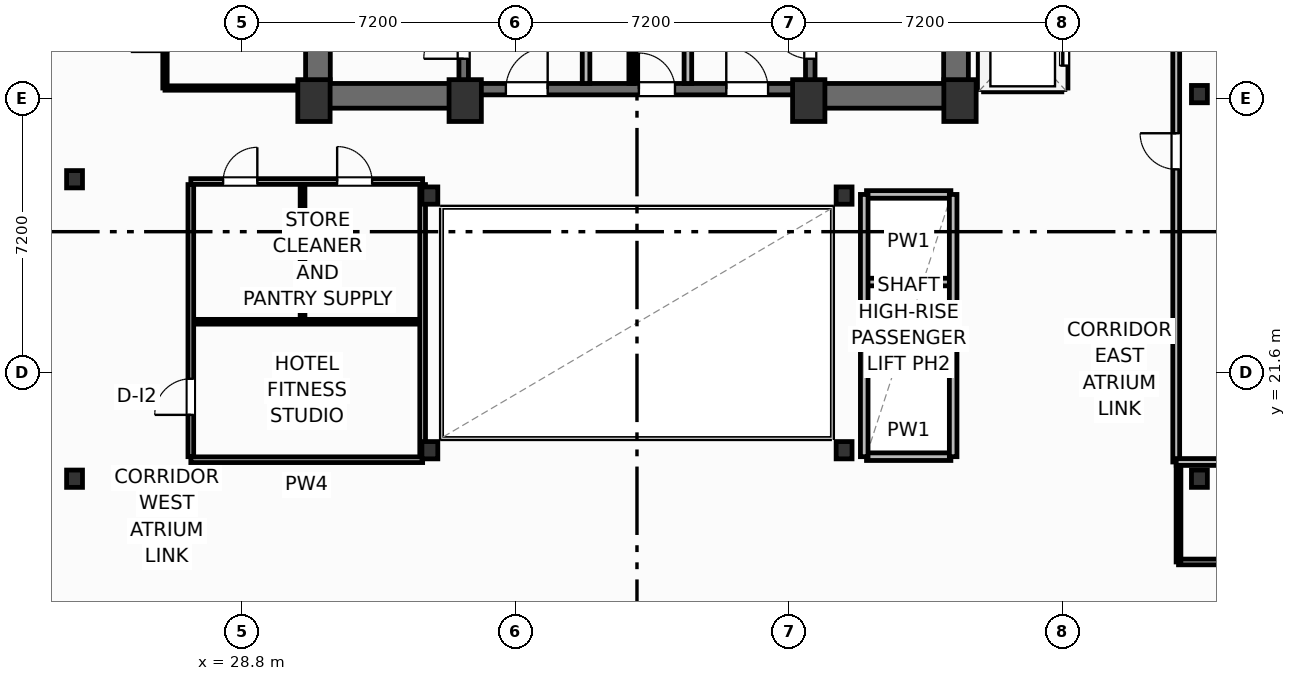
"""IFC4 building model, lengths in metres.
Left out: names, types, materials, properties, quantities, classifications, styles, units other than length and angle.
Written with IfcOpenShell. Run it as: python <this file> out.ifc"""

import sys

from ifc_helpers import new_model, si_unit, direction, frame, frame_2d, origin, origin_2d, place, context, subcontext, project, spatial, rectangle, i_section, extrude, element, fill, save


model = new_model("IFC4")
c1 = context("Model", 3, precision=1e-05, world=origin(), true_north=direction((0.0, 1.0)))
c2 = subcontext(c1, "Body", "Model", "MODEL_VIEW")
j1 = project(units=[si_unit("LENGTHUNIT", "METRE"), si_unit("PLANEANGLEUNIT", "RADIAN")], contexts=[c1])
p1 = place(None, origin())
s1 = spatial("IfcSite", under=j1, at=p1, CompositionType="ELEMENT")
p2 = place(p1, origin())
s2 = spatial("IfcBuilding", under=s1, at=p2, CompositionType="ELEMENT")
p3 = place(p2, frame((0.0, 0.0, 204.2)))
s3 = spatial("IfcBuildingStorey", under=s2, at=p3, CompositionType="ELEMENT", Elevation=204.2)
for number, where, z_axis, x_axis in (
    (1, (30.7, 28.75, 0.0), (0.0, 0.0, 1.0), (1.0, 0.0, 0.0)),
    (2, (34.68, 28.75, 0.0), (0.0, 0.0, 1.0), (1.0, 0.0, 0.0)),
    (3, (43.72, 28.75, 0.0), (0.0, 0.0, 1.0), (1.0, 0.0, 0.0)),
    (4, (47.7, 28.75, 0.0), (0.0, 0.0, 1.0), (1.0, 0.0, 0.0)),
):
    element("IfcColumn", number, at=place(p3, frame(where, z_axis=z_axis, x_axis=x_axis)), inside=s3, PredefinedType="COLUMN", context=c2, shape_type="SweptSolid", body=[
        extrude(rectangle(XDim=0.85, YDim=1.1, at=origin_2d()), origin(), (0.0, 0.0, 1.0), 3.7),
    ])
for number, where, z_axis, x_axis in (
    (5, (33.75, 19.55, 0.0), (0.0, 0.0, 1.0), (1.0, 0.0, 0.0)),
    (6, (44.65, 19.55, 0.0), (0.0, 0.0, 1.0), (1.0, 0.0, 0.0)),
    (7, (33.75, 26.25, 0.0), (0.0, 0.0, 1.0), (1.0, 0.0, 0.0)),
    (8, (44.65, 26.25, 0.0), (0.0, 0.0, 1.0), (1.0, 0.0, 0.0)),
    (9, (24.4, 18.8, 0.0), (0.0, 0.0, 1.0), (1.0, 0.0, 0.0)),
    (10, (24.4, 26.68, 0.0), (0.0, 0.0, 1.0), (1.0, 0.0, 0.0)),
    (11, (54.0, 18.8, 0.0), (0.0, 0.0, 1.0), (1.0, 0.0, 0.0)),
    (12, (54.0, 28.92, 0.0), (0.0, 0.0, 1.0), (1.0, 0.0, 0.0)),
):
    element("IfcColumn", number, at=place(p3, frame(where, z_axis=z_axis, x_axis=x_axis)), inside=s3, PredefinedType="COLUMN", context=c2, shape_type="SweptSolid", body=[
        extrude(i_section(OverallWidth=0.418, OverallDepth=0.455, WebThickness=0.042, FlangeThickness=0.068, FilletRadius=0.025, at=origin_2d()), origin(), (0.0, 0.0, 1.0), 3.7),
    ])
for number, where, z_axis, x_axis in (
    (13, (30.805, 29.2, 0.0), (0.0, 0.0, 1.0), (0.0, 1.0, 0.0)),
    (14, (47.595, 29.2, 0.0), (0.0, 0.0, 1.0), (0.0, 1.0, 0.0)),
):
    element("IfcWall", number, at=place(p3, frame(where, z_axis=z_axis, x_axis=x_axis)), inside=s3, PredefinedType="SHEAR", context=c2, shape_type="SweptSolid", body=[
        extrude(rectangle(XDim=9.22, YDim=0.65, at=frame_2d((4.61, 0.0))), origin(), (0.0, 0.0, 1.0), 3.38),
    ])
p4 = place(p3, frame((30.48, 28.875, 0.0), z_axis=(0.0, 0.0, 1.0), x_axis=(1.0, 0.0, 0.0)))
e15 = element("IfcWall", 15, at=p4, inside=s3, PredefinedType="SHEAR", context=c2, shape_type="SweptSolid", body=[
    extrude(rectangle(XDim=4.32, YDim=0.65, at=frame_2d((2.16, 0.0))), origin(), (0.0, 0.0, 1.0), 3.38),
])
p5 = place(p3, frame((43.6, 28.875, 0.0), z_axis=(0.0, 0.0, 1.0), x_axis=(1.0, 0.0, 0.0)))
e16 = element("IfcWall", 16, at=p5, inside=s3, PredefinedType="SHEAR", context=c2, shape_type="SweptSolid", body=[
    extrude(rectangle(XDim=4.32, YDim=0.65, at=frame_2d((2.16, 0.0))), origin(), (0.0, 0.0, 1.0), 3.38),
])
p6 = place(p3, frame((34.8, 29.05, 0.0), z_axis=(0.0, 0.0, 1.0), x_axis=(1.0, 0.0, 0.0)))
e17 = element("IfcWall", 17, at=p6, inside=s3, PredefinedType="SHEAR", context=c2, shape_type="SweptSolid", body=[
    extrude(rectangle(XDim=8.8, YDim=0.3, at=frame_2d((4.4, 0.0))), origin(), (0.0, 0.0, 1.0), 3.38),
])
p7 = place(p6, frame((0.95, 0.0, 0.0)))
e18 = element("IfcOpeningElement", 18, at=p7, cuts=e17, PredefinedType="OPENING", context=c2, shape_type="SweptSolid", body=[
    extrude(rectangle(XDim=1.1, YDim=2.15, at=frame_2d((0.55, 1.075))), frame((0.0, 0.16, 0.0), z_axis=(0.0, -1.0, 0.0), x_axis=(1.0, 0.0, 0.0)), (0.0, 0.0, 1.0), 0.32),
])
p8 = place(p6, frame((6.75, 0.0, 0.0)))
e19 = element("IfcOpeningElement", 19, at=p8, cuts=e17, PredefinedType="OPENING", context=c2, shape_type="SweptSolid", body=[
    extrude(rectangle(XDim=1.1, YDim=2.15, at=frame_2d((0.55, 1.075))), frame((0.0, 0.16, 0.0), z_axis=(0.0, -1.0, 0.0), x_axis=(1.0, 0.0, 0.0)), (0.0, 0.0, 1.0), 0.32),
])
p9 = place(p6, frame((4.45, 0.0, 0.0)))
e20 = element("IfcOpeningElement", 20, at=p9, cuts=e17, PredefinedType="OPENING", context=c2, shape_type="SweptSolid", body=[
    extrude(rectangle(XDim=0.95, YDim=2.15, at=frame_2d((0.475, 1.075))), frame((0.0, 0.16, 0.0), z_axis=(0.0, -1.0, 0.0), x_axis=(1.0, 0.0, 0.0)), (0.0, 0.0, 1.0), 0.32),
])
p10 = place(p3, frame((34.64, 29.2, 0.0), z_axis=(0.0, 0.0, 1.0), x_axis=(0.0, 1.0, 0.0)))
e21 = element("IfcWall", 21, at=p10, inside=s3, PredefinedType="SHEAR", context=c2, shape_type="SweptSolid", body=[
    extrude(rectangle(XDim=9.22, YDim=0.25, at=frame_2d((4.61, 0.0))), origin(), (0.0, 0.0, 1.0), 3.38),
])
p11 = place(p10, frame((0.65, 0.0, 0.0)))
e22 = element("IfcOpeningElement", 22, at=p11, cuts=e21, PredefinedType="OPENING", context=c2, shape_type="SweptSolid", body=[
    extrude(rectangle(XDim=1.05, YDim=2.15, at=frame_2d((0.525, 1.075))), frame((0.0, 0.135, 0.0), z_axis=(0.0, -1.0, 0.0), x_axis=(1.0, 0.0, 0.0)), (0.0, 0.0, 1.0), 0.27),
])
p12 = place(p3, frame((43.76, 29.2, 0.0), z_axis=(0.0, 0.0, 1.0), x_axis=(0.0, 1.0, 0.0)))
e23 = element("IfcWall", 23, at=p12, inside=s3, PredefinedType="SHEAR", context=c2, shape_type="SweptSolid", body=[
    extrude(rectangle(XDim=9.22, YDim=0.25, at=frame_2d((4.61, 0.0))), origin(), (0.0, 0.0, 1.0), 3.38),
])
p13 = place(p12, frame((0.65, 0.0, 0.0)))
e24 = element("IfcOpeningElement", 24, at=p13, cuts=e23, PredefinedType="OPENING", context=c2, shape_type="SweptSolid", body=[
    extrude(rectangle(XDim=1.05, YDim=2.15, at=frame_2d((0.525, 1.075))), frame((0.0, 0.135, 0.0), z_axis=(0.0, -1.0, 0.0), x_axis=(1.0, 0.0, 0.0)), (0.0, 0.0, 1.0), 0.27),
])
p14 = place(p3, frame((53.45, 16.61, 0.0), z_axis=(0.0, 0.0, 1.0), x_axis=(1.0, 0.0, 0.0)))
e25 = element("IfcWall", 25, at=p14, inside=s3, PredefinedType="PARTITIONING", context=c2, shape_type="SweptSolid", body=[
    extrude(rectangle(XDim=16.55, YDim=0.15, at=frame_2d((8.275, 0.0))), origin(), (0.0, 0.0, 1.0), 3.38),
])
p15 = place(p14, frame((2.61, 0.0, 0.0)))
e26 = element("IfcOpeningElement", 26, at=p15, cuts=e25, PredefinedType="OPENING", context=c2, shape_type="SweptSolid", body=[
    extrude(rectangle(XDim=0.92, YDim=2.05, at=frame_2d((0.46, 1.025))), frame((0.0, 0.085, 0.0), z_axis=(0.0, -1.0, 0.0), x_axis=(1.0, 0.0, 0.0)), (0.0, 0.0, 1.0), 0.17),
])
p16 = place(p3, frame((53.45, 16.61, 0.0), z_axis=(0.0, 0.0, 1.0), x_axis=(0.0, 1.0, 0.0)))
e27 = element("IfcWall", 27, at=p16, inside=s3, PredefinedType="PARTITIONING", context=c2, shape_type="SweptSolid", body=[
    extrude(rectangle(XDim=2.63, YDim=0.125, at=frame_2d((1.315, 0.0))), origin(), (0.0, 0.0, 1.0), 1.165),
])
p17 = place(p3, frame((53.39, 19.24, 0.0), z_axis=(0.0, 0.0, 1.0), x_axis=(0.0, 1.0, 0.0)))
e28 = element("IfcWall", 28, at=p17, inside=s3, PredefinedType="PARTITIONING", context=c2, shape_type="SweptSolid", body=[
    extrude(rectangle(XDim=20.06, YDim=0.18, at=frame_2d((10.03, 0.0))), origin(), (0.0, 0.0, 1.0), 3.38),
])
p18 = place(p17, frame((7.7, 0.0, 0.0)))
e29 = element("IfcOpeningElement", 29, at=p18, cuts=e28, PredefinedType="OPENING", context=c2, shape_type="SweptSolid", body=[
    extrude(rectangle(XDim=0.95, YDim=2.05, at=frame_2d((0.475, 1.025))), frame((0.0, 0.1, 0.0), z_axis=(0.0, -1.0, 0.0), x_axis=(1.0, 0.0, 0.0)), (0.0, 0.0, 1.0), 0.2),
])
p19 = place(p3, frame((53.39, 19.24, 0.0), z_axis=(0.0, 0.0, 1.0), x_axis=(1.0, 0.0, 0.0)))
e30 = element("IfcWall", 30, at=p19, inside=s3, PredefinedType="PARTITIONING", context=c2, shape_type="SweptSolid", body=[
    extrude(rectangle(XDim=21.922, YDim=0.18, at=frame_2d((10.961, 0.0))), origin(), (0.0, 0.0, 1.0), 1.165),
])
for number, where, z_axis, x_axis in (
    (31, (37.86, 29.2, 0.0), (0.0, 0.0, 1.0), (0.0, 1.0, 0.0)),
    (32, (40.54, 29.2, 0.0), (0.0, 0.0, 1.0), (0.0, 1.0, 0.0)),
):
    element("IfcWall", number, at=place(p3, frame(where, z_axis=z_axis, x_axis=x_axis)), inside=s3, PredefinedType="PARTITIONING", context=c2, shape_type="SweptSolid", body=[
        extrude(rectangle(XDim=5.18, YDim=0.2, at=frame_2d((2.59, 0.0))), origin(), (0.0, 0.0, 1.0), 3.38),
    ])
p20 = place(p3, frame((39.05, 29.2, 0.0), z_axis=(0.0, 0.0, 1.0), x_axis=(0.0, 1.0, 0.0)))
e33 = element("IfcWall", 33, at=p20, inside=s3, PredefinedType="PARTITIONING", context=c2, shape_type="SweptSolid", body=[
    extrude(rectangle(XDim=5.22, YDim=0.125, at=frame_2d((2.61, 0.0))), origin(), (0.0, 0.0, 1.0), 3.38),
])
p21 = place(p20, frame((2.05, 0.0, 0.0)))
e34 = element("IfcOpeningElement", 34, at=p21, cuts=e33, PredefinedType="OPENING", context=c2, shape_type="SweptSolid", body=[
    extrude(rectangle(XDim=0.85, YDim=2.05, at=frame_2d((0.425, 1.025))), frame((0.0, 0.073, 0.0), z_axis=(0.0, -1.0, 0.0), x_axis=(1.0, 0.0, 0.0)), (0.0, 0.0, 1.0), 0.145),
])
p22 = place(p3, frame((27.46, 19.3, 0.0), z_axis=(0.0, 0.0, 1.0), x_axis=(1.0, 0.0, 0.0)))
e35 = element("IfcWall", 35, at=p22, inside=s3, PredefinedType="PARTITIONING", context=c2, shape_type="SweptSolid", body=[
    extrude(rectangle(XDim=6.1, YDim=0.15, at=frame_2d((3.05, 0.0))), origin(), (0.0, 0.0, 1.0), 2.592),
])
p23 = place(p3, frame((27.46, 26.62, 0.0), z_axis=(0.0, 0.0, 1.0), x_axis=(1.0, 0.0, 0.0)))
e36 = element("IfcWall", 36, at=p23, inside=s3, PredefinedType="PARTITIONING", context=c2, shape_type="SweptSolid", body=[
    extrude(rectangle(XDim=6.1, YDim=0.15, at=frame_2d((3.05, 0.0))), origin(), (0.0, 0.0, 1.0), 2.592),
])
p24 = place(p23, frame((0.85, 0.0, 0.0)))
e37 = element("IfcOpeningElement", 37, at=p24, cuts=e36, PredefinedType="OPENING", context=c2, shape_type="SweptSolid", body=[
    extrude(rectangle(XDim=0.9, YDim=2.05, at=frame_2d((0.45, 1.025))), frame((0.0, 0.085, 0.0), z_axis=(0.0, -1.0, 0.0), x_axis=(1.0, 0.0, 0.0)), (0.0, 0.0, 1.0), 0.17),
])
p25 = place(p23, frame((3.85, 0.0, 0.0)))
e38 = element("IfcOpeningElement", 38, at=p25, cuts=e36, PredefinedType="OPENING", context=c2, shape_type="SweptSolid", body=[
    extrude(rectangle(XDim=0.92, YDim=2.05, at=frame_2d((0.46, 1.025))), frame((0.0, 0.085, 0.0), z_axis=(0.0, -1.0, 0.0), x_axis=(1.0, 0.0, 0.0)), (0.0, 0.0, 1.0), 0.17),
])
p26 = place(p3, frame((27.52, 22.93, 0.0), z_axis=(0.0, 0.0, 1.0), x_axis=(1.0, 0.0, 0.0)))
e39 = element("IfcWall", 39, at=p26, inside=s3, PredefinedType="PARTITIONING", context=c2, shape_type="SweptSolid", body=[
    extrude(rectangle(XDim=6.0, YDim=0.125, at=frame_2d((3.0, 0.0))), origin(), (0.0, 0.0, 1.0), 3.38),
])
p27 = place(p3, frame((30.4, 23.0, 0.0), z_axis=(0.0, 0.0, 1.0), x_axis=(0.0, 1.0, 0.0)))
e40 = element("IfcWall", 40, at=p27, inside=s3, PredefinedType="PARTITIONING", context=c2, shape_type="SweptSolid", body=[
    extrude(rectangle(XDim=3.54, YDim=0.125, at=frame_2d((1.77, 0.0))), origin(), (0.0, 0.0, 1.0), 3.38),
])
p28 = place(p3, frame((27.46, 19.38, 0.0), z_axis=(0.0, 0.0, 1.0), x_axis=(0.0, 1.0, 0.0)))
e41 = element("IfcWall", 41, at=p28, inside=s3, PredefinedType="PARTITIONING", context=c2, shape_type="SweptSolid", body=[
    extrude(rectangle(XDim=7.16, YDim=0.15, at=frame_2d((3.58, 0.0))), origin(), (0.0, 0.0, 1.0), 3.38),
])
p29 = place(p28, frame((1.1, 0.0, 0.0)))
e42 = element("IfcOpeningElement", 42, at=p29, cuts=e41, PredefinedType="OPENING", context=c2, shape_type="SweptSolid", body=[
    extrude(rectangle(XDim=0.95, YDim=2.05, at=frame_2d((0.475, 1.025))), frame((0.0, 0.085, 0.0), z_axis=(0.0, -1.0, 0.0), x_axis=(1.0, 0.0, 0.0)), (0.0, 0.0, 1.0), 0.17),
])
p30 = place(p3, frame((33.56, 19.38, 0.0), z_axis=(0.0, 0.0, 1.0), x_axis=(0.0, 1.0, 0.0)))
e43 = element("IfcWall", 43, at=p30, inside=s3, PredefinedType="PARTITIONING", context=c2, shape_type="SweptSolid", body=[
    extrude(rectangle(XDim=7.16, YDim=0.15, at=frame_2d((3.58, 0.0))), origin(), (0.0, 0.0, 1.0), 1.165),
])
p31 = place(p3, frame((26.78, 29.08, 0.0), z_axis=(0.0, 0.0, 1.0), x_axis=(1.0, 0.0, 0.0)))
e44 = element("IfcWall", 44, at=p31, inside=s3, PredefinedType="PARTITIONING", context=c2, shape_type="SweptSolid", body=[
    extrude(rectangle(XDim=3.7, YDim=0.115, at=frame_2d((1.85, 0.0))), origin(), (0.0, 0.0, 1.0), 3.38),
])
p32 = place(p3, frame((26.78, 29.08, 0.0), z_axis=(0.0, 0.0, 1.0), x_axis=(0.0, 1.0, 0.0)))
e45 = element("IfcWall", 45, at=p32, inside=s3, PredefinedType="PARTITIONING", context=c2, shape_type="SweptSolid", body=[
    extrude(rectangle(XDim=3.11, YDim=0.115, at=frame_2d((1.555, 0.0))), origin(), (0.0, 0.0, 1.0), 3.38),
])
p33 = place(p32, frame((0.95, 0.0, 0.0)))
e46 = element("IfcOpeningElement", 46, at=p33, cuts=e45, PredefinedType="OPENING", context=c2, shape_type="SweptSolid", body=[
    extrude(rectangle(XDim=0.9, YDim=2.05, at=frame_2d((0.45, 1.025))), frame((0.0, 0.067, 0.0), z_axis=(0.0, -1.0, 0.0), x_axis=(1.0, 0.0, 0.0)), (0.0, 0.0, 1.0), 0.135),
])
p34 = place(p3, frame((48.32, 29.08, 0.0), z_axis=(0.0, 0.0, 1.0), x_axis=(1.0, 0.0, 0.0)))
e47 = element("IfcWall", 47, at=p34, inside=s3, PredefinedType="PARTITIONING", context=c2, shape_type="SweptSolid", body=[
    extrude(rectangle(XDim=2.06, YDim=0.2, at=frame_2d((1.03, 0.0))), origin(), (0.0, 0.0, 1.0), 2.592),
])
p35 = place(p3, frame((48.28, 29.08, 0.0), z_axis=(0.0, 0.0, 1.0), x_axis=(0.0, 1.0, 0.0)))
e48 = element("IfcWall", 48, at=p35, inside=s3, PredefinedType="PARTITIONING", context=c2, shape_type="SweptSolid", body=[
    extrude(rectangle(XDim=6.89, YDim=0.2, at=frame_2d((3.445, 0.0))), origin(), (0.0, 0.0, 1.0), 3.38),
])
p36 = place(p3, frame((50.44, 29.08, 0.0), z_axis=(0.0, 0.0, 1.0), x_axis=(0.0, 1.0, 0.0)))
e49 = element("IfcWall", 49, at=p36, inside=s3, PredefinedType="PARTITIONING", context=c2, shape_type="SweptSolid", body=[
    extrude(rectangle(XDim=6.89, YDim=0.2, at=frame_2d((3.445, 0.0))), origin(), (0.0, 0.0, 1.0), 3.38),
])
p37 = place(p36, frame((0.59, 0.0, 0.0)))
e50 = element("IfcOpeningElement", 50, at=p37, cuts=e49, PredefinedType="OPENING", context=c2, shape_type="SweptSolid", body=[
    extrude(rectangle(XDim=1.1, YDim=2.15, at=frame_2d((0.55, 1.075))), frame((0.0, 0.11, 0.0), z_axis=(0.0, -1.0, 0.0), x_axis=(1.0, 0.0, 0.0)), (0.0, 0.0, 1.0), 0.22),
])
p38 = place(p36, frame((2.89, 0.0, 0.0)))
e51 = element("IfcOpeningElement", 51, at=p38, cuts=e49, PredefinedType="OPENING", context=c2, shape_type="SweptSolid", body=[
    extrude(rectangle(XDim=1.1, YDim=2.15, at=frame_2d((0.55, 1.075))), frame((0.0, 0.11, 0.0), z_axis=(0.0, -1.0, 0.0), x_axis=(1.0, 0.0, 0.0)), (0.0, 0.0, 1.0), 0.22),
])
p39 = place(p36, frame((5.19, 0.0, 0.0)))
e52 = element("IfcOpeningElement", 52, at=p39, cuts=e49, PredefinedType="OPENING", context=c2, shape_type="SweptSolid", body=[
    extrude(rectangle(XDim=1.1, YDim=2.15, at=frame_2d((0.55, 1.075))), frame((0.0, 0.11, 0.0), z_axis=(0.0, -1.0, 0.0), x_axis=(1.0, 0.0, 0.0)), (0.0, 0.0, 1.0), 0.22),
])
for number, where, z_axis, x_axis in (
    (53, (45.24, 21.675, 0.0), (0.0, 0.0, 1.0), (1.0, 0.0, 0.0)),
    (54, (45.24, 23.975, 0.0), (0.0, 0.0, 1.0), (1.0, 0.0, 0.0)),
):
    element("IfcWall", number, at=place(p3, frame(where, z_axis=z_axis, x_axis=x_axis)), inside=s3, PredefinedType="PARTITIONING", context=c2, shape_type="SweptSolid", body=[
        extrude(rectangle(XDim=2.22, YDim=0.2, at=frame_2d((1.11, 0.0))), origin(), (0.0, 0.0, 1.0), 3.38),
    ])
p40 = place(p3, frame((45.24, 19.38, 0.0), z_axis=(0.0, 0.0, 1.0), x_axis=(1.0, 0.0, 0.0)))
e55 = element("IfcWall", 55, at=p40, inside=s3, PredefinedType="PARTITIONING", context=c2, shape_type="SweptSolid", body=[
    extrude(rectangle(XDim=2.22, YDim=0.2, at=frame_2d((1.11, 0.0))), origin(), (0.0, 0.0, 1.0), 2.592),
])
p41 = place(p3, frame((45.24, 26.28, 0.0), z_axis=(0.0, 0.0, 1.0), x_axis=(1.0, 0.0, 0.0)))
e56 = element("IfcWall", 56, at=p41, inside=s3, PredefinedType="PARTITIONING", context=c2, shape_type="SweptSolid", body=[
    extrude(rectangle(XDim=2.22, YDim=0.2, at=frame_2d((1.11, 0.0))), origin(), (0.0, 0.0, 1.0), 3.38),
])
for number, where, z_axis, x_axis in (
    (57, (45.18, 19.38, 0.0), (0.0, 0.0, 1.0), (0.0, 1.0, 0.0)),
    (58, (47.52, 19.38, 0.0), (0.0, 0.0, 1.0), (0.0, 1.0, 0.0)),
):
    element("IfcWall", number, at=place(p3, frame(where, z_axis=z_axis, x_axis=x_axis)), inside=s3, PredefinedType="PARTITIONING", context=c2, shape_type="SweptSolid", body=[
        extrude(rectangle(XDim=6.9, YDim=0.2, at=frame_2d((3.45, 0.0))), origin(), (0.0, 0.0, 1.0), 3.38),
    ])
p42 = place(p18, origin())
e59 = element("IfcDoor", 59, at=p42, inside=s3, OperationType="SINGLE_SWING_RIGHT", PredefinedType="DOOR", context=c2, shape_type="SweptSolid", body=[
    extrude(rectangle(XDim=0.95, YDim=2.05, at=frame_2d((0.475, 1.025))), frame((0.0, 0.025, 0.0), z_axis=(0.0, -1.0, 0.0), x_axis=(1.0, 0.0, 0.0)), (0.0, 0.0, 1.0), 0.05),
])
fill(e29, e59)
p43 = place(p11, origin())
e60 = element("IfcDoor", 60, at=p43, inside=s3, OperationType="SINGLE_SWING_LEFT", PredefinedType="DOOR", context=c2, shape_type="SweptSolid", body=[
    extrude(rectangle(XDim=1.05, YDim=2.15, at=frame_2d((0.525, 1.075))), frame((0.0, 0.025, 0.0), z_axis=(0.0, -1.0, 0.0), x_axis=(1.0, 0.0, 0.0)), (0.0, 0.0, 1.0), 0.05),
])
fill(e22, e60)
p44 = place(p13, origin())
e61 = element("IfcDoor", 61, at=p44, inside=s3, OperationType="SINGLE_SWING_RIGHT", PredefinedType="DOOR", context=c2, shape_type="SweptSolid", body=[
    extrude(rectangle(XDim=1.05, YDim=2.15, at=frame_2d((0.525, 1.075))), frame((0.0, 0.025, 0.0), z_axis=(0.0, -1.0, 0.0), x_axis=(1.0, 0.0, 0.0)), (0.0, 0.0, 1.0), 0.05),
])
fill(e24, e61)
p45 = place(p7, origin())
e62 = element("IfcDoor", 62, at=p45, inside=s3, OperationType="SINGLE_SWING_RIGHT", PredefinedType="DOOR", context=c2, shape_type="SweptSolid", body=[
    extrude(rectangle(XDim=1.1, YDim=2.15, at=frame_2d((0.55, 1.075))), frame((0.0, 0.025, 0.0), z_axis=(0.0, -1.0, 0.0), x_axis=(1.0, 0.0, 0.0)), (0.0, 0.0, 1.0), 0.05),
])
fill(e18, e62)
p46 = place(p8, origin())
e63 = element("IfcDoor", 63, at=p46, inside=s3, OperationType="SINGLE_SWING_LEFT", PredefinedType="DOOR", context=c2, shape_type="SweptSolid", body=[
    extrude(rectangle(XDim=1.1, YDim=2.15, at=frame_2d((0.55, 1.075))), frame((0.0, 0.025, 0.0), z_axis=(0.0, -1.0, 0.0), x_axis=(1.0, 0.0, 0.0)), (0.0, 0.0, 1.0), 0.05),
])
fill(e19, e63)
p47 = place(p9, origin())
e64 = element("IfcDoor", 64, at=p47, inside=s3, OperationType="SINGLE_SWING_LEFT", PredefinedType="DOOR", context=c2, shape_type="SweptSolid", body=[
    extrude(rectangle(XDim=0.95, YDim=2.15, at=frame_2d((0.475, 1.075))), frame((0.0, 0.025, 0.0), z_axis=(0.0, -1.0, 0.0), x_axis=(1.0, 0.0, 0.0)), (0.0, 0.0, 1.0), 0.05),
])
fill(e20, e64)
p48 = place(p24, origin())
e65 = element("IfcDoor", 65, at=p48, inside=s3, OperationType="SINGLE_SWING_RIGHT", PredefinedType="DOOR", context=c2, shape_type="SweptSolid", body=[
    extrude(rectangle(XDim=0.9, YDim=2.05, at=frame_2d((0.45, 1.025))), frame((0.0, 0.025, 0.0), z_axis=(0.0, -1.0, 0.0), x_axis=(1.0, 0.0, 0.0)), (0.0, 0.0, 1.0), 0.05),
])
fill(e37, e65)
p49 = place(p25, origin())
e66 = element("IfcDoor", 66, at=p49, inside=s3, OperationType="SINGLE_SWING_LEFT", PredefinedType="DOOR", context=c2, shape_type="SweptSolid", body=[
    extrude(rectangle(XDim=0.92, YDim=2.05, at=frame_2d((0.46, 1.025))), frame((0.0, 0.025, 0.0), z_axis=(0.0, -1.0, 0.0), x_axis=(1.0, 0.0, 0.0)), (0.0, 0.0, 1.0), 0.05),
])
fill(e38, e66)
p50 = place(p29, origin())
e67 = element("IfcDoor", 67, at=p50, inside=s3, OperationType="SINGLE_SWING_LEFT", PredefinedType="DOOR", context=c2, shape_type="SweptSolid", body=[
    extrude(rectangle(XDim=0.95, YDim=2.05, at=frame_2d((0.475, 1.025))), frame((0.0, 0.025, 0.0), z_axis=(0.0, -1.0, 0.0), x_axis=(1.0, 0.0, 0.0)), (0.0, 0.0, 1.0), 0.05),
])
fill(e42, e67)
p51 = place(p37, origin())
e68 = element("IfcDoor", 68, at=p51, inside=s3, OperationType="SLIDING_TO_LEFT", PredefinedType="DOOR", context=c2, shape_type="SweptSolid", body=[
    extrude(rectangle(XDim=1.1, YDim=2.15, at=frame_2d((0.55, 1.075))), frame((0.0, 0.025, 0.0), z_axis=(0.0, -1.0, 0.0), x_axis=(1.0, 0.0, 0.0)), (0.0, 0.0, 1.0), 0.05),
])
fill(e50, e68)
save(model, sys.argv[1])
